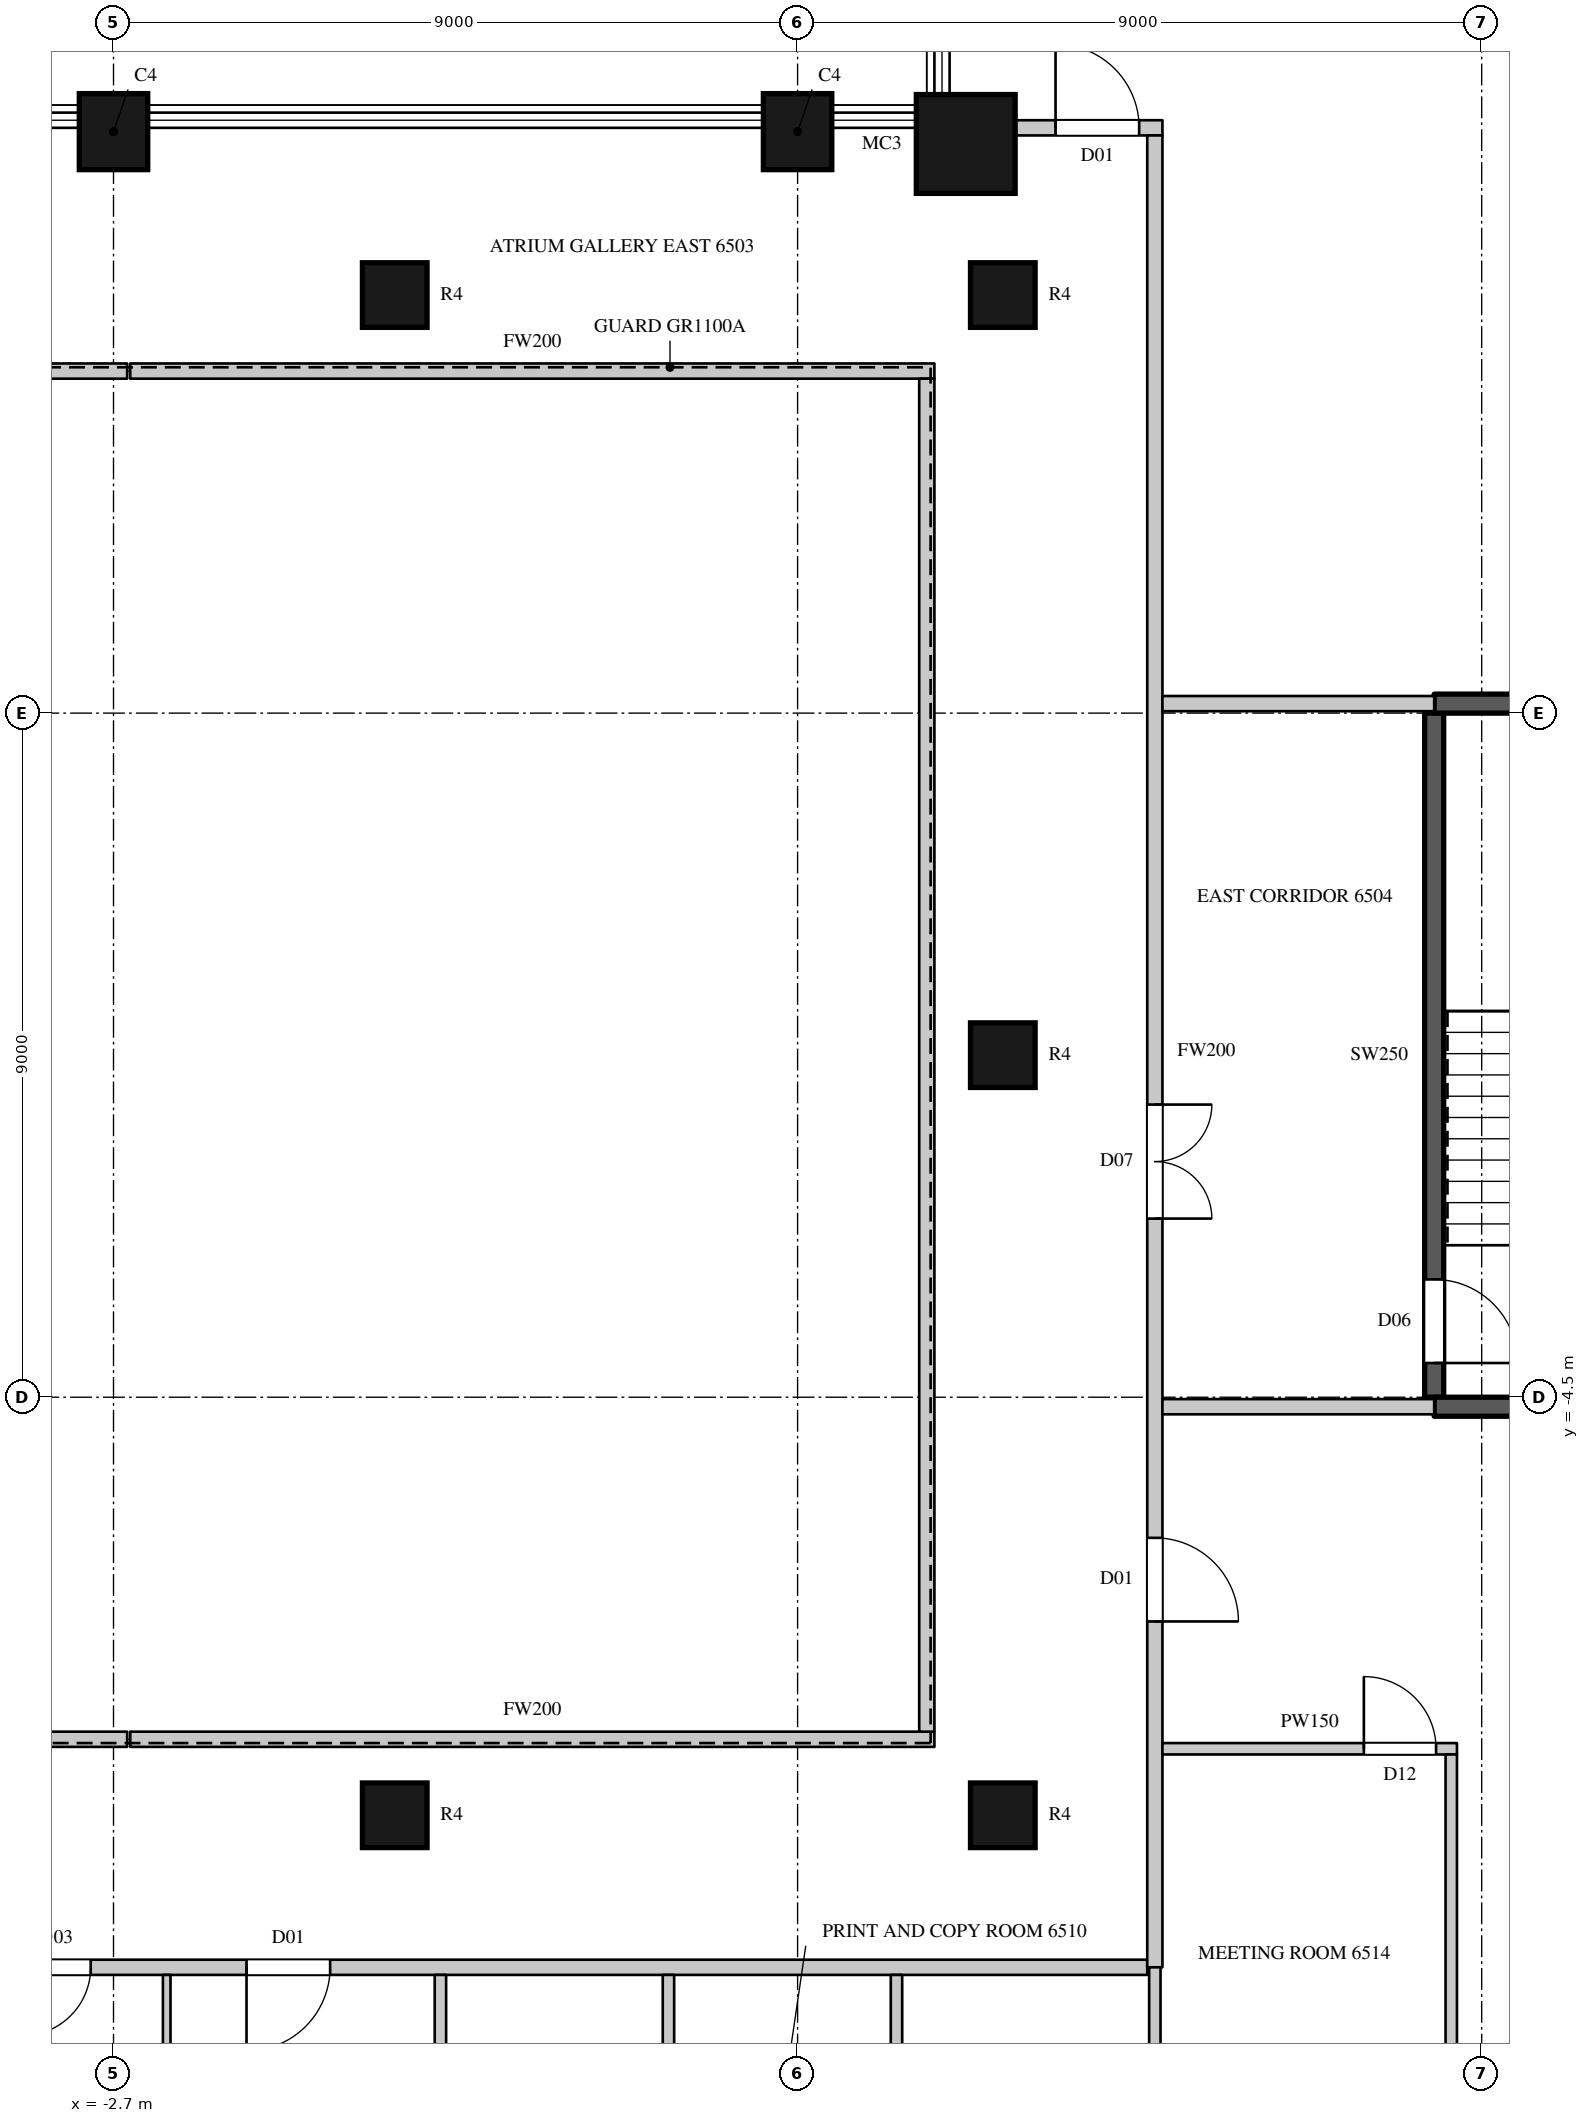
"""IFC4 building model, lengths in metres.
Left out: names, types, materials, properties, quantities, classifications, styles, units other than length and angle.
Written with IfcOpenShell. Run it as: python <this file> out.ifc"""

import sys

from ifc_helpers import new_model, si_unit, direction, frame, frame_2d, origin, origin_2d, place, context, subcontext, project, spatial, rectangle, circle, extrude, element, fill, save


model = new_model("IFC4")
c1 = context("Model", 3, precision=1e-05, world=origin(), true_north=direction((0.0, 1.0)))
c2 = subcontext(c1, "Body", "Model", "MODEL_VIEW")
j1 = project(units=[si_unit("LENGTHUNIT", "METRE"), si_unit("PLANEANGLEUNIT", "RADIAN")], contexts=[c1])
p1 = place(None, origin())
s1 = spatial("IfcSite", under=j1, at=p1, CompositionType="ELEMENT")
p2 = place(p1, origin())
s2 = spatial("IfcBuilding", under=s1, at=p2, CompositionType="ELEMENT")
p3 = place(p2, frame((0.0, 0.0, 288.5)))
s3 = spatial("IfcBuildingStorey", under=s2, at=p3, CompositionType="ELEMENT", Elevation=288.5)
p4 = place(p3, frame((8.512, 11.988, 0.0), z_axis=(0.0, 0.0, 1.0), x_axis=(1.0, 0.0, 0.0)))
e1 = element("IfcColumn", 1, at=p4, inside=s3, PredefinedType="COLUMN", context=c2, shape_type="SweptSolid", body=[
    extrude(circle(Radius=0.65, at=origin_2d()), origin(), (0.0, 0.0, 1.0), 4.1),
])
for number, where, z_axis, x_axis in (
    (2, (6.3, 12.15, 0.0), (0.0, 0.0, 1.0), (-1.0, 0.0, 0.0)),
    (3, (-2.7, 12.15, 0.0), (0.0, 0.0, 1.0), (-1.0, 0.0, 0.0)),
):
    element("IfcColumn", number, at=place(p3, frame(where, z_axis=z_axis, x_axis=x_axis)), inside=s3, PredefinedType="COLUMN", context=c2, shape_type="SweptSolid", body=[
        extrude(rectangle(XDim=0.9, YDim=1.0, at=origin_2d()), origin(), (0.0, 0.0, 1.0), 4.1),
    ])
for number, where, z_axis, x_axis in (
    (4, (1.0, -10.0, 0.0), (0.0, 0.0, 1.0), (1.0, 0.0, 0.0)),
    (5, (1.0, 10.0, 0.0), (0.0, 0.0, 1.0), (1.0, 0.0, 0.0)),
    (6, (9.0, -10.0, 0.0), (0.0, 0.0, 1.0), (1.0, 0.0, 0.0)),
    (7, (9.0, 0.0, 0.0), (0.0, 0.0, 1.0), (1.0, 0.0, 0.0)),
    (8, (9.0, 10.0, 0.0), (0.0, 0.0, 1.0), (1.0, 0.0, 0.0)),
):
    element("IfcColumn", number, at=place(p3, frame(where, z_axis=z_axis, x_axis=x_axis)), inside=s3, PredefinedType="COLUMN", context=c2, shape_type="SweptSolid", body=[
        extrude(circle(Radius=0.425, at=origin_2d()), origin(), (0.0, 0.0, 1.0), 4.1),
    ])
p5 = place(p3, frame((-10.9, -12.0, 0.0), z_axis=(0.0, 0.0, 1.0), x_axis=(1.0, 0.0, 0.0)))
e9 = element("IfcWall", 9, at=p5, inside=s3, PredefinedType="PARTITIONING", context=c2, shape_type="SweptSolid", body=[
    extrude(rectangle(XDim=21.8, YDim=0.2, at=frame_2d((10.9, 0.0))), origin(), (0.0, 0.0, 1.0), 3.8),
])
p6 = place(p5, frame((1.1, 0.0, 0.0)))
e10 = element("IfcOpeningElement", 10, at=p6, cuts=e9, PredefinedType="OPENING", context=c2, shape_type="SweptSolid", body=[
    extrude(rectangle(XDim=0.9, YDim=2.2, at=frame_2d((0.45, 1.1))), frame((0.0, 0.11, 0.0), z_axis=(0.0, -1.0, 0.0), x_axis=(1.0, 0.0, 0.0)), (0.0, 0.0, 1.0), 0.22),
])
p7 = place(p5, frame((4.9, 0.0, 0.0)))
e11 = element("IfcOpeningElement", 11, at=p7, cuts=e9, PredefinedType="OPENING", context=c2, shape_type="SweptSolid", body=[
    extrude(rectangle(XDim=0.9, YDim=2.2, at=frame_2d((0.45, 1.1))), frame((0.0, 0.11, 0.0), z_axis=(0.0, -1.0, 0.0), x_axis=(1.0, 0.0, 0.0)), (0.0, 0.0, 1.0), 0.22),
])
p8 = place(p5, frame((7.0, 0.0, 0.0)))
e12 = element("IfcOpeningElement", 12, at=p8, cuts=e9, PredefinedType="OPENING", context=c2, shape_type="SweptSolid", body=[
    extrude(rectangle(XDim=0.9, YDim=2.2, at=frame_2d((0.45, 1.1))), frame((0.0, 0.11, 0.0), z_axis=(0.0, -1.0, 0.0), x_axis=(1.0, 0.0, 0.0)), (0.0, 0.0, 1.0), 0.22),
])
p9 = place(p5, frame((9.95, 0.0, 0.0)))
e13 = element("IfcOpeningElement", 13, at=p9, cuts=e9, PredefinedType="OPENING", context=c2, shape_type="SweptSolid", body=[
    extrude(rectangle(XDim=1.1, YDim=2.4, at=frame_2d((0.55, 1.2))), frame((0.0, 0.11, 0.0), z_axis=(0.0, -1.0, 0.0), x_axis=(1.0, 0.0, 0.0)), (0.0, 0.0, 1.0), 0.22),
])
for number, where, z_axis, x_axis in (
    (14, (-6.1, -9.0, 0.0), (0.0, 0.0, 1.0), (1.0, 0.0, 0.0)),
    (15, (-6.1, 9.0, 0.0), (0.0, 0.0, 1.0), (1.0, 0.0, 0.0)),
):
    element("IfcWall", number, at=place(p3, frame(where, z_axis=z_axis, x_axis=x_axis)), inside=s3, PredefinedType="PARTITIONING", context=c2, shape_type="SweptSolid", body=[
        extrude(rectangle(XDim=3.58, YDim=0.2, at=frame_2d((1.79, 0.0))), origin(), (0.0, 0.0, 1.0), 3.8),
    ])
for number, where, z_axis, x_axis in (
    (16, (-2.48, -9.0, 0.0), (0.0, 0.0, 1.0), (1.0, 0.0, 0.0)),
    (17, (-2.48, 9.0, 0.0), (0.0, 0.0, 1.0), (1.0, 0.0, 0.0)),
):
    element("IfcWall", number, at=place(p3, frame(where, z_axis=z_axis, x_axis=x_axis)), inside=s3, PredefinedType="PARTITIONING", context=c2, shape_type="SweptSolid", body=[
        extrude(rectangle(XDim=10.58, YDim=0.2, at=frame_2d((5.29, 0.0))), origin(), (0.0, 0.0, 1.0), 3.8),
    ])
p10 = place(p3, frame((8.0, -8.9, 0.0), z_axis=(0.0, 0.0, 1.0), x_axis=(0.0, 1.0, 0.0)))
e18 = element("IfcWall", 18, at=p10, inside=s3, PredefinedType="PARTITIONING", context=c2, shape_type="SweptSolid", body=[
    extrude(rectangle(XDim=17.8, YDim=0.2, at=frame_2d((8.9, 0.0))), origin(), (0.0, 0.0, 1.0), 3.8),
])
p11 = place(p3, frame((9.144, 12.2, 0.0), z_axis=(0.0, 0.0, 1.0), x_axis=(1.0, 0.0, 0.0)))
e19 = element("IfcWall", 19, at=p11, inside=s3, PredefinedType="PARTITIONING", context=c2, shape_type="SweptSolid", body=[
    extrude(rectangle(XDim=1.956, YDim=0.2, at=frame_2d((0.978, 0.0))), origin(), (0.0, 0.0, 1.0), 3.8),
])
p12 = place(p11, frame((0.55, 0.0, 0.0)))
e20 = element("IfcOpeningElement", 20, at=p12, cuts=e19, PredefinedType="OPENING", context=c2, shape_type="SweptSolid", body=[
    extrude(rectangle(XDim=1.1, YDim=2.4, at=frame_2d((0.55, 1.2))), frame((0.0, 0.11, 0.0), z_axis=(0.0, -1.0, 0.0), x_axis=(1.0, 0.0, 0.0)), (0.0, 0.0, 1.0), 0.22),
])
p13 = place(p3, frame((11.0, -12.0, 0.0), z_axis=(0.0, 0.0, 1.0), x_axis=(0.0, 1.0, 0.0)))
e21 = element("IfcWall", 21, at=p13, inside=s3, PredefinedType="PARTITIONING", context=c2, shape_type="SweptSolid", body=[
    extrude(rectangle(XDim=24.1, YDim=0.2, at=frame_2d((12.05, 0.0))), origin(), (0.0, 0.0, 1.0), 3.8),
])
p14 = place(p13, frame((9.85, 0.0, 0.0)))
e22 = element("IfcOpeningElement", 22, at=p14, cuts=e21, PredefinedType="OPENING", context=c2, shape_type="SweptSolid", body=[
    extrude(rectangle(XDim=1.5, YDim=2.4, at=frame_2d((0.75, 1.2))), frame((0.0, 0.11, 0.0), z_axis=(0.0, -1.0, 0.0), x_axis=(1.0, 0.0, 0.0)), (0.0, 0.0, 1.0), 0.22),
])
p15 = place(p13, frame((4.55, 0.0, 0.0)))
e23 = element("IfcOpeningElement", 23, at=p15, cuts=e21, PredefinedType="OPENING", context=c2, shape_type="SweptSolid", body=[
    extrude(rectangle(XDim=1.1, YDim=2.4, at=frame_2d((0.55, 1.2))), frame((0.0, 0.11, 0.0), z_axis=(0.0, -1.0, 0.0), x_axis=(1.0, 0.0, 0.0)), (0.0, 0.0, 1.0), 0.22),
])
for number, where, z_axis, x_axis in (
    (24, (11.1, -4.625, 0.0), (0.0, 0.0, 1.0), (1.0, 0.0, 0.0)),
    (25, (11.1, 4.625, 0.0), (0.0, 0.0, 1.0), (1.0, 0.0, 0.0)),
):
    element("IfcWall", number, at=place(p3, frame(where, z_axis=z_axis, x_axis=x_axis)), inside=s3, PredefinedType="PARTITIONING", context=c2, shape_type="SweptSolid", body=[
        extrude(rectangle(XDim=3.575, YDim=0.2, at=frame_2d((1.788, 0.0))), origin(), (0.0, 0.0, 1.0), 3.8),
    ])
p16 = place(p3, frame((1.601, -15.525, 0.0), z_axis=(0.0, 0.0, 1.0), x_axis=(0.0, 1.0, 0.0)))
e26 = element("IfcWall", 26, at=p16, inside=s3, PredefinedType="PARTITIONING", context=c2, shape_type="SweptSolid", body=[
    extrude(rectangle(XDim=3.425, YDim=0.15, at=frame_2d((1.712, 0.0))), origin(), (0.0, 0.0, 1.0), 3.8),
])
p17 = place(p16, frame((1.25, 0.0, 0.0)))
e27 = element("IfcOpeningElement", 27, at=p17, cuts=e26, PredefinedType="OPENING", context=c2, shape_type="SweptSolid", body=[
    extrude(rectangle(XDim=0.95, YDim=2.2, at=frame_2d((0.475, 1.1))), frame((0.0, 0.085, 0.0), z_axis=(0.0, -1.0, 0.0), x_axis=(1.0, 0.0, 0.0)), (0.0, 0.0, 1.0), 0.17),
])
for number, where, z_axis, x_axis in (
    (28, (4.601, -15.525, 0.0), (0.0, 0.0, 1.0), (0.0, 1.0, 0.0)),
    (29, (7.601, -15.525, 0.0), (0.0, 0.0, 1.0), (0.0, 1.0, 0.0)),
):
    element("IfcWall", number, at=place(p3, frame(where, z_axis=z_axis, x_axis=x_axis)), inside=s3, PredefinedType="PARTITIONING", context=c2, shape_type="SweptSolid", body=[
        extrude(rectangle(XDim=3.425, YDim=0.15, at=frame_2d((1.712, 0.0))), origin(), (0.0, 0.0, 1.0), 3.8),
    ])
p18 = place(p3, frame((11.0, -20.721, 0.0), z_axis=(0.0, 0.0, 1.0), x_axis=(0.0, 1.0, 0.0)))
e30 = element("IfcWall", 30, at=p18, inside=s3, PredefinedType="PARTITIONING", context=c2, shape_type="SweptSolid", body=[
    extrude(rectangle(XDim=8.721, YDim=0.15, at=frame_2d((4.361, 0.0))), origin(), (0.0, 0.0, 1.0), 3.8),
])
p19 = place(p3, frame((11.1, -9.125, 0.0), z_axis=(0.0, 0.0, 1.0), x_axis=(1.0, 0.0, 0.0)))
e31 = element("IfcWall", 31, at=p19, inside=s3, PredefinedType="PARTITIONING", context=c2, shape_type="SweptSolid", body=[
    extrude(rectangle(XDim=3.875, YDim=0.15, at=frame_2d((1.938, 0.0))), origin(), (0.0, 0.0, 1.0), 3.8),
])
p20 = place(p19, frame((2.65, 0.0, 0.0)))
e32 = element("IfcOpeningElement", 32, at=p20, cuts=e31, PredefinedType="OPENING", context=c2, shape_type="SweptSolid", body=[
    extrude(rectangle(XDim=0.95, YDim=2.2, at=frame_2d((0.475, 1.1))), frame((0.0, 0.085, 0.0), z_axis=(0.0, -1.0, 0.0), x_axis=(1.0, 0.0, 0.0)), (0.0, 0.0, 1.0), 0.17),
])
p21 = place(p3, frame((14.9, -16.55, 0.0), z_axis=(0.0, 0.0, 1.0), x_axis=(0.0, 1.0, 0.0)))
e33 = element("IfcWall", 33, at=p21, inside=s3, PredefinedType="PARTITIONING", context=c2, shape_type="SweptSolid", body=[
    extrude(rectangle(XDim=7.35, YDim=0.15, at=frame_2d((3.675, 0.0))), origin(), (0.0, 0.0, 1.0), 3.8),
])
p22 = place(p3, frame((14.675, -4.5, 0.0), z_axis=(0.0, 0.0, 1.0), x_axis=(0.0, 1.0, 0.0)))
e34 = element("IfcWall", 34, at=p22, inside=s3, PredefinedType="SHEAR", context=c2, shape_type="SweptSolid", body=[
    extrude(rectangle(XDim=9.0, YDim=0.25, at=frame_2d((4.5, 0.0))), origin(), (0.0, 0.0, 1.0), 3.8),
])
p23 = place(p22, frame((0.45, 0.0, 0.0)))
e35 = element("IfcOpeningElement", 35, at=p23, cuts=e34, PredefinedType="OPENING", context=c2, shape_type="SweptSolid", body=[
    extrude(rectangle(XDim=1.1, YDim=2.2, at=frame_2d((0.55, 1.1))), frame((0.0, 0.135, 0.0), z_axis=(0.0, -1.0, 0.0), x_axis=(1.0, 0.0, 0.0)), (0.0, 0.0, 1.0), 0.27),
])
for number, where, z_axis, x_axis in (
    (36, (14.675, -4.625, 0.0), (0.0, 0.0, 1.0), (1.0, 0.0, 0.0)),
    (37, (14.675, 4.625, 0.0), (0.0, 0.0, 1.0), (1.0, 0.0, 0.0)),
):
    element("IfcWall", number, at=place(p3, frame(where, z_axis=z_axis, x_axis=x_axis)), inside=s3, PredefinedType="SHEAR", context=c2, shape_type="SweptSolid", body=[
        extrude(rectangle(XDim=4.45, YDim=0.25, at=frame_2d((2.225, 0.0))), origin(), (0.0, 0.0, 1.0), 3.8),
    ])
p24 = place(p3, frame((-2.0, -23.447, 0.0), z_axis=(0.0, 0.0, 1.0), x_axis=(0.0, 1.0, 0.0)))
e38 = element("IfcWall", 38, at=p24, inside=s3, PredefinedType="PARTITIONING", context=c2, shape_type="SweptSolid", body=[
    extrude(rectangle(XDim=11.347, YDim=0.1, at=frame_2d((5.674, 0.0))), origin(), (0.0, 0.0, 1.0), 3.8),
])
p25 = place(p14, origin())
e39 = element("IfcDoor", 39, at=p25, inside=s3, OperationType="DOUBLE_DOOR_SINGLE_SWING", PredefinedType="DOOR", context=c2, shape_type="SweptSolid", body=[
    extrude(rectangle(XDim=1.5, YDim=2.4, at=frame_2d((0.75, 1.2))), frame((0.0, 0.025, 0.0), z_axis=(0.0, -1.0, 0.0), x_axis=(1.0, 0.0, 0.0)), (0.0, 0.0, 1.0), 0.05),
])
fill(e22, e39)
p26 = place(p8, origin())
e40 = element("IfcDoor", 40, at=p26, inside=s3, OperationType="SINGLE_SWING_RIGHT", PredefinedType="DOOR", context=c2, shape_type="SweptSolid", body=[
    extrude(rectangle(XDim=0.9, YDim=2.2, at=frame_2d((0.45, 1.1))), frame((0.0, 0.025, 0.0), z_axis=(0.0, -1.0, 0.0), x_axis=(1.0, 0.0, 0.0)), (0.0, 0.0, 1.0), 0.05),
])
fill(e12, e40)
p27 = place(p9, origin())
e41 = element("IfcDoor", 41, at=p27, inside=s3, OperationType="SINGLE_SWING_RIGHT", PredefinedType="DOOR", context=c2, shape_type="SweptSolid", body=[
    extrude(rectangle(XDim=1.1, YDim=2.4, at=frame_2d((0.55, 1.2))), frame((0.0, 0.025, 0.0), z_axis=(0.0, -1.0, 0.0), x_axis=(1.0, 0.0, 0.0)), (0.0, 0.0, 1.0), 0.05),
])
fill(e13, e41)
p28 = place(p12, origin())
e42 = element("IfcDoor", 42, at=p28, inside=s3, OperationType="SINGLE_SWING_LEFT", PredefinedType="DOOR", context=c2, shape_type="SweptSolid", body=[
    extrude(rectangle(XDim=1.1, YDim=2.4, at=frame_2d((0.55, 1.2))), frame((0.0, 0.025, 0.0), z_axis=(0.0, -1.0, 0.0), x_axis=(1.0, 0.0, 0.0)), (0.0, 0.0, 1.0), 0.05),
])
fill(e20, e42)
p29 = place(p15, origin())
e43 = element("IfcDoor", 43, at=p29, inside=s3, OperationType="SINGLE_SWING_RIGHT", PredefinedType="DOOR", context=c2, shape_type="SweptSolid", body=[
    extrude(rectangle(XDim=1.1, YDim=2.4, at=frame_2d((0.55, 1.2))), frame((0.0, 0.025, 0.0), z_axis=(0.0, -1.0, 0.0), x_axis=(1.0, 0.0, 0.0)), (0.0, 0.0, 1.0), 0.05),
])
fill(e23, e43)
p30 = place(p20, origin())
e44 = element("IfcDoor", 44, at=p30, inside=s3, OperationType="SINGLE_SWING_LEFT", PredefinedType="DOOR", context=c2, shape_type="SweptSolid", body=[
    extrude(rectangle(XDim=0.95, YDim=2.2, at=frame_2d((0.475, 1.1))), frame((0.0, 0.025, 0.0), z_axis=(0.0, -1.0, 0.0), x_axis=(1.0, 0.0, 0.0)), (0.0, 0.0, 1.0), 0.05),
])
fill(e32, e44)
p31 = place(p23, origin())
e45 = element("IfcDoor", 45, at=p31, inside=s3, OperationType="SINGLE_SWING_RIGHT", PredefinedType="DOOR", context=c2, shape_type="SweptSolid", body=[
    extrude(rectangle(XDim=1.1, YDim=2.2, at=frame_2d((0.55, 1.1))), frame((0.0, 0.025, 0.0), z_axis=(0.0, -1.0, 0.0), x_axis=(1.0, 0.0, 0.0)), (0.0, 0.0, 1.0), 0.05),
])
fill(e35, e45)
save(model, sys.argv[1])
